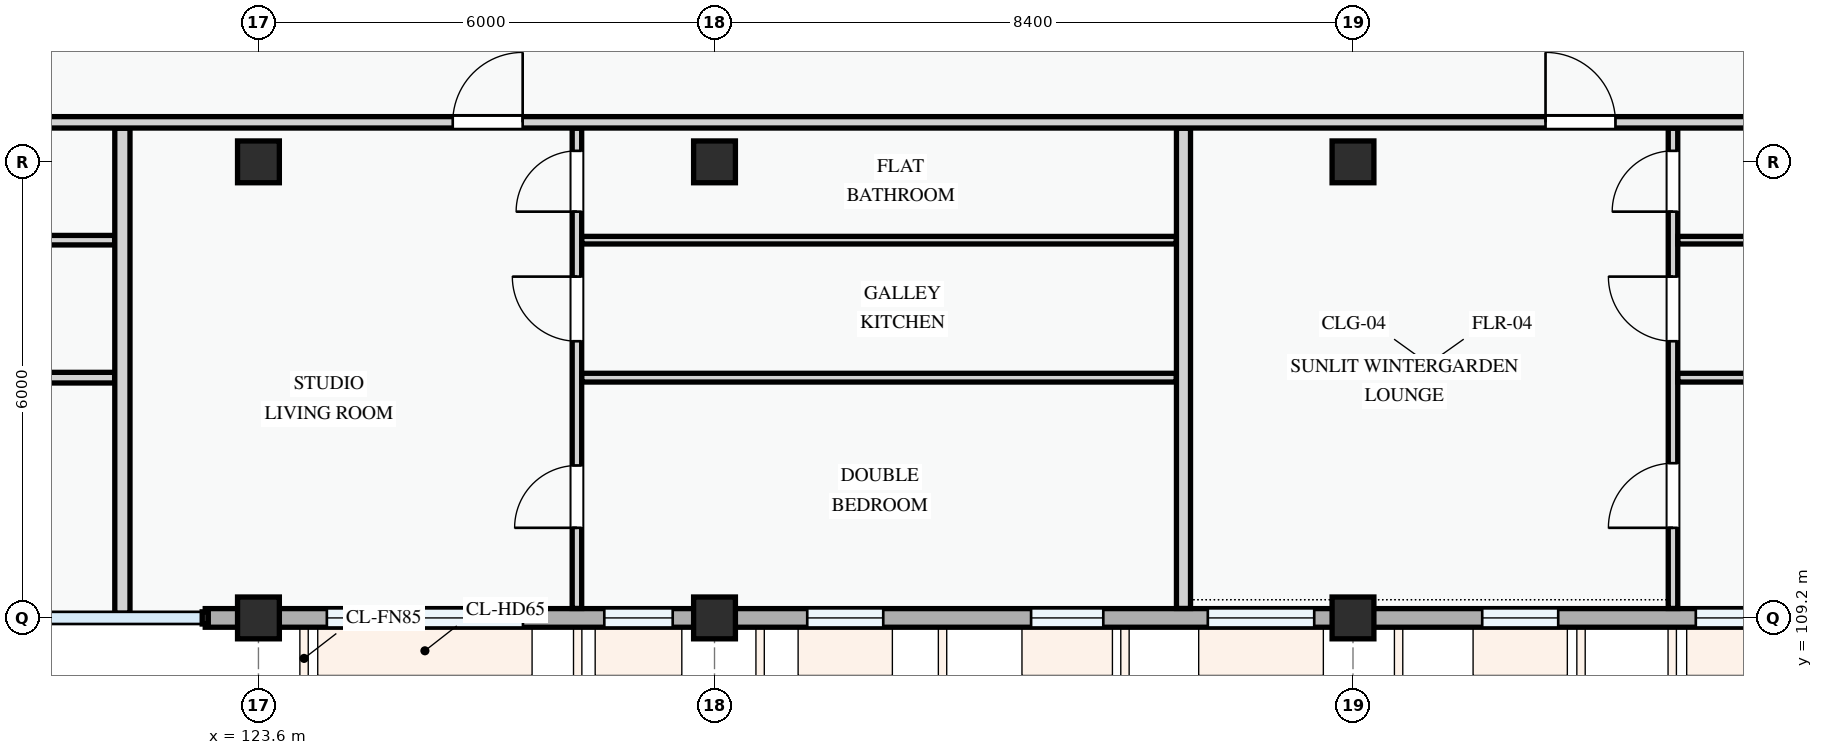
"""IFC4 building model, lengths in metres.
Left out: names, types, materials, properties, quantities, classifications, styles, units other than length and angle.
Written with IfcOpenShell. Run it as: python <this file> out.ifc"""

import sys

from ifc_helpers import new_model, si_unit, direction, frame, frame_2d, origin, origin_2d, place, context, subcontext, project, spatial, rectangle, extrude, element, fill, save


model = new_model("IFC4")
c1 = context("Model", 3, precision=1e-05, world=origin(), true_north=direction((0.0, 1.0)))
c2 = subcontext(c1, "Body", "Model", "MODEL_VIEW")
j1 = project(units=[si_unit("LENGTHUNIT", "METRE"), si_unit("PLANEANGLEUNIT", "RADIAN")], contexts=[c1])
p1 = place(None, origin())
s1 = spatial("IfcSite", under=j1, at=p1, CompositionType="ELEMENT")
p2 = place(p1, origin())
s2 = spatial("IfcBuilding", under=s1, at=p2, CompositionType="ELEMENT")
p3 = place(p2, frame((0.0, 0.0, 37.8)))
s3 = spatial("IfcBuildingStorey", under=s2, at=p3, CompositionType="ELEMENT", Elevation=37.8)
for number, where, z_axis, x_axis in (
    (1, (123.6, 109.2, 0.0), (0.0, 0.0, 1.0), (1.0, 0.0, 0.0)),
    (2, (123.6, 115.2, 0.0), (0.0, 0.0, 1.0), (1.0, 0.0, 0.0)),
    (3, (129.6, 109.2, 0.0), (0.0, 0.0, 1.0), (1.0, 0.0, 0.0)),
    (4, (129.6, 115.2, 0.0), (0.0, 0.0, 1.0), (1.0, 0.0, 0.0)),
    (5, (138.0, 109.2, 0.0), (0.0, 0.0, 1.0), (1.0, 0.0, 0.0)),
    (6, (138.0, 115.2, 0.0), (0.0, 0.0, 1.0), (1.0, 0.0, 0.0)),
):
    element("IfcColumn", number, at=place(p3, frame(where, z_axis=z_axis, x_axis=x_axis)), inside=s3, PredefinedType="COLUMN", context=c2, shape_type="SweptSolid", body=[
        extrude(rectangle(XDim=0.55, YDim=0.55, at=origin_2d()), origin(), (0.0, 0.0, 1.0), 3.3),
    ])
p4 = place(p3, frame((122.9, 109.2, 0.0), z_axis=(0.0, 0.0, 1.0), x_axis=(1.0, 0.0, 0.0)))
e7 = element("IfcWall", 7, at=p4, inside=s3, PredefinedType="STANDARD", context=c2, shape_type="SweptSolid", body=[
    extrude(rectangle(XDim=0.7, YDim=0.245, at=frame_2d((0.35, 0.0))), origin(), (0.0, 0.0, 1.0), 2.375),
])
p5 = place(p3, frame((123.6, 109.2, 0.0), z_axis=(0.0, 0.0, 1.0), x_axis=(1.0, 0.0, 0.0)))
e8 = element("IfcWall", 8, at=p5, inside=s3, PredefinedType="STANDARD", context=c2, shape_type="SweptSolid", body=[
    extrude(rectangle(XDim=6.0, YDim=0.245, at=frame_2d((3.0, 0.0))), origin(), (0.0, 0.0, 1.0), 2.525),
])
p6 = place(p5, frame((0.9, 0.0, 0.78)))
e9 = element("IfcOpeningElement", 9, at=p6, cuts=e8, PredefinedType="OPENING", context=c2, shape_type="SweptSolid", body=[
    extrude(rectangle(XDim=2.58, YDim=1.48, at=frame_2d((1.29, 0.74))), frame((0.0, 0.133, 0.0), z_axis=(0.0, -1.0, 0.0), x_axis=(1.0, 0.0, 0.0)), (0.0, 0.0, 1.0), 0.265),
])
p7 = place(p5, frame((4.55, 0.0, 0.78)))
e10 = element("IfcOpeningElement", 10, at=p7, cuts=e8, PredefinedType="OPENING", context=c2, shape_type="SweptSolid", body=[
    extrude(rectangle(XDim=0.9, YDim=1.2, at=frame_2d((0.45, 0.6))), frame((0.0, 0.133, 0.0), z_axis=(0.0, -1.0, 0.0), x_axis=(1.0, 0.0, 0.0)), (0.0, 0.0, 1.0), 0.265),
])
p8 = place(p3, frame((129.6, 109.2, 0.0), z_axis=(0.0, 0.0, 1.0), x_axis=(1.0, 0.0, 0.0)))
e11 = element("IfcWall", 11, at=p8, inside=s3, PredefinedType="STANDARD", context=c2, shape_type="SweptSolid", body=[
    extrude(rectangle(XDim=8.4, YDim=0.245, at=frame_2d((4.2, 0.0))), origin(), (0.0, 0.0, 1.0), 2.375),
])
p9 = place(p8, frame((1.22, 0.0, 0.78)))
e12 = element("IfcOpeningElement", 12, at=p9, cuts=e11, PredefinedType="OPENING", context=c2, shape_type="SweptSolid", body=[
    extrude(rectangle(XDim=1.0, YDim=1.25, at=frame_2d((0.5, 0.625))), frame((0.0, 0.133, 0.0), z_axis=(0.0, -1.0, 0.0), x_axis=(1.0, 0.0, 0.0)), (0.0, 0.0, 1.0), 0.265),
])
p10 = place(p8, frame((4.165, 0.0, 0.78)))
e13 = element("IfcOpeningElement", 13, at=p10, cuts=e11, PredefinedType="OPENING", context=c2, shape_type="SweptSolid", body=[
    extrude(rectangle(XDim=0.95, YDim=1.15, at=frame_2d((0.475, 0.575))), frame((0.0, 0.133, 0.0), z_axis=(0.0, -1.0, 0.0), x_axis=(1.0, 0.0, 0.0)), (0.0, 0.0, 1.0), 0.265),
])
p11 = place(p8, frame((6.49, 0.0, 0.78)))
e14 = element("IfcOpeningElement", 14, at=p11, cuts=e11, PredefinedType="OPENING", context=c2, shape_type="SweptSolid", body=[
    extrude(rectangle(XDim=1.4, YDim=1.45, at=frame_2d((0.7, 0.725))), frame((0.0, 0.133, 0.0), z_axis=(0.0, -1.0, 0.0), x_axis=(1.0, 0.0, 0.0)), (0.0, 0.0, 1.0), 0.265),
])
p12 = place(p3, frame((138.0, 109.2, 0.0), z_axis=(0.0, 0.0, 1.0), x_axis=(1.0, 0.0, 0.0)))
e15 = element("IfcWall", 15, at=p12, inside=s3, PredefinedType="STANDARD", context=c2, shape_type="SweptSolid", body=[
    extrude(rectangle(XDim=6.0, YDim=0.245, at=frame_2d((3.0, 0.0))), origin(), (0.0, 0.0, 1.0), 2.525),
])
p13 = place(p12, frame((1.7, 0.0, 0.78)))
e16 = element("IfcOpeningElement", 16, at=p13, cuts=e15, PredefinedType="OPENING", context=c2, shape_type="SweptSolid", body=[
    extrude(rectangle(XDim=1.0, YDim=1.25, at=frame_2d((0.5, 0.625))), frame((0.0, 0.133, 0.0), z_axis=(0.0, -1.0, 0.0), x_axis=(1.0, 0.0, 0.0)), (0.0, 0.0, 1.0), 0.265),
])
p14 = place(p12, frame((4.51, 0.0, 0.78)))
e17 = element("IfcOpeningElement", 17, at=p14, cuts=e15, PredefinedType="OPENING", context=c2, shape_type="SweptSolid", body=[
    extrude(rectangle(XDim=1.0, YDim=1.25, at=frame_2d((0.5, 0.625))), frame((0.0, 0.133, 0.0), z_axis=(0.0, -1.0, 0.0), x_axis=(1.0, 0.0, 0.0)), (0.0, 0.0, 1.0), 0.265),
])
p15 = place(p3, frame((116.987, 112.361, 0.0), z_axis=(0.0, 0.0, 1.0), x_axis=(1.0, 0.0, 0.0)))
e18 = element("IfcWall", 18, at=p15, inside=s3, PredefinedType="PARTITIONING", context=c2, shape_type="SweptSolid", body=[
    extrude(rectangle(XDim=4.721, YDim=0.14, at=frame_2d((2.36, 0.0))), origin(), (0.0, 0.0, 1.0), 3.0),
])
p16 = place(p3, frame((116.987, 114.17, 0.0), z_axis=(0.0, 0.0, 1.0), x_axis=(1.0, 0.0, 0.0)))
e19 = element("IfcWall", 19, at=p16, inside=s3, PredefinedType="PARTITIONING", context=c2, shape_type="SweptSolid", body=[
    extrude(rectangle(XDim=4.721, YDim=0.125, at=frame_2d((2.36, 0.0))), origin(), (0.0, 0.0, 1.0), 3.0),
])
p17 = place(p3, frame((127.79, 109.324, 0.0), z_axis=(0.0, 0.0, 1.0), x_axis=(0.0, 1.0, 0.0)))
e20 = element("IfcWall", 20, at=p17, inside=s3, PredefinedType="PARTITIONING", context=c2, shape_type="SweptSolid", body=[
    extrude(rectangle(XDim=6.319, YDim=0.125, at=frame_2d((3.159, 0.0))), origin(), (0.0, 0.0, 1.0), 3.0),
])
p18 = place(p17, frame((1.061, 0.0, 0.0)))
e21 = element("IfcOpeningElement", 21, at=p18, cuts=e20, PredefinedType="OPENING", context=c2, shape_type="SweptSolid", body=[
    extrude(rectangle(XDim=0.82, YDim=2.08, at=frame_2d((0.41, 1.04))), frame((0.0, 0.073, 0.0), z_axis=(0.0, -1.0, 0.0), x_axis=(1.0, 0.0, 0.0)), (0.0, 0.0, 1.0), 0.145),
])
p19 = place(p17, frame((3.516, 0.0, 0.0)))
e22 = element("IfcOpeningElement", 22, at=p19, cuts=e20, PredefinedType="OPENING", context=c2, shape_type="SweptSolid", body=[
    extrude(rectangle(XDim=0.85, YDim=2.1, at=frame_2d((0.425, 1.05))), frame((0.0, 0.073, 0.0), z_axis=(0.0, -1.0, 0.0), x_axis=(1.0, 0.0, 0.0)), (0.0, 0.0, 1.0), 0.145),
])
p20 = place(p17, frame((5.22, 0.0, 0.0)))
e23 = element("IfcOpeningElement", 23, at=p20, cuts=e20, PredefinedType="OPENING", context=c2, shape_type="SweptSolid", body=[
    extrude(rectangle(XDim=0.8, YDim=2.1, at=frame_2d((0.4, 1.05))), frame((0.0, 0.073, 0.0), z_axis=(0.0, -1.0, 0.0), x_axis=(1.0, 0.0, 0.0)), (0.0, 0.0, 1.0), 0.145),
])
p21 = place(p3, frame((127.854, 112.361, 0.0), z_axis=(0.0, 0.0, 1.0), x_axis=(1.0, 0.0, 0.0)))
e24 = element("IfcWall", 24, at=p21, inside=s3, PredefinedType="PARTITIONING", context=c2, shape_type="SweptSolid", body=[
    extrude(rectangle(XDim=7.821, YDim=0.115, at=frame_2d((3.911, 0.0))), origin(), (0.0, 0.0, 1.0), 3.0),
])
p22 = place(p3, frame((127.854, 114.17, 0.0), z_axis=(0.0, 0.0, 1.0), x_axis=(1.0, 0.0, 0.0)))
e25 = element("IfcWall", 25, at=p22, inside=s3, PredefinedType="PARTITIONING", context=c2, shape_type="SweptSolid", body=[
    extrude(rectangle(XDim=7.821, YDim=0.1, at=frame_2d((3.911, 0.0))), origin(), (0.0, 0.0, 1.0), 3.0),
])
p23 = place(p3, frame((121.81, 109.26, 0.0), z_axis=(0.0, 0.0, 1.0), x_axis=(0.0, 1.0, 0.0)))
e26 = element("IfcWall", 26, at=p23, inside=s3, PredefinedType="PARTITIONING", context=c2, shape_type="SweptSolid", body=[
    extrude(rectangle(XDim=6.383, YDim=0.2, at=frame_2d((3.191, 0.0))), origin(), (0.0, 0.0, 1.0), 3.0),
])
p24 = place(p3, frame((142.21, 109.324, 0.0), z_axis=(0.0, 0.0, 1.0), x_axis=(0.0, 1.0, 0.0)))
e27 = element("IfcWall", 27, at=p24, inside=s3, PredefinedType="PARTITIONING", context=c2, shape_type="SweptSolid", body=[
    extrude(rectangle(XDim=6.319, YDim=0.125, at=frame_2d((3.159, 0.0))), origin(), (0.0, 0.0, 1.0), 3.0),
])
p25 = place(p24, frame((1.061, 0.0, 0.0)))
e28 = element("IfcOpeningElement", 28, at=p25, cuts=e27, PredefinedType="OPENING", context=c2, shape_type="SweptSolid", body=[
    extrude(rectangle(XDim=0.85, YDim=2.1, at=frame_2d((0.425, 1.05))), frame((0.0, 0.073, 0.0), z_axis=(0.0, -1.0, 0.0), x_axis=(1.0, 0.0, 0.0)), (0.0, 0.0, 1.0), 0.145),
])
p26 = place(p24, frame((3.516, 0.0, 0.0)))
e29 = element("IfcOpeningElement", 29, at=p26, cuts=e27, PredefinedType="OPENING", context=c2, shape_type="SweptSolid", body=[
    extrude(rectangle(XDim=0.85, YDim=2.1, at=frame_2d((0.425, 1.05))), frame((0.0, 0.073, 0.0), z_axis=(0.0, -1.0, 0.0), x_axis=(1.0, 0.0, 0.0)), (0.0, 0.0, 1.0), 0.145),
])
p27 = place(p24, frame((5.22, 0.0, 0.0)))
e30 = element("IfcOpeningElement", 30, at=p27, cuts=e27, PredefinedType="OPENING", context=c2, shape_type="SweptSolid", body=[
    extrude(rectangle(XDim=0.8, YDim=2.1, at=frame_2d((0.4, 1.05))), frame((0.0, 0.073, 0.0), z_axis=(0.0, -1.0, 0.0), x_axis=(1.0, 0.0, 0.0)), (0.0, 0.0, 1.0), 0.145),
])
p28 = place(p3, frame((142.274, 112.361, 0.0), z_axis=(0.0, 0.0, 1.0), x_axis=(1.0, 0.0, 0.0)))
e31 = element("IfcWall", 31, at=p28, inside=s3, PredefinedType="PARTITIONING", context=c2, shape_type="SweptSolid", body=[
    extrude(rectangle(XDim=7.698, YDim=0.115, at=frame_2d((3.849, 0.0))), origin(), (0.0, 0.0, 1.0), 3.0),
])
p29 = place(p3, frame((142.274, 114.17, 0.0), z_axis=(0.0, 0.0, 1.0), x_axis=(1.0, 0.0, 0.0)))
e32 = element("IfcWall", 32, at=p29, inside=s3, PredefinedType="PARTITIONING", context=c2, shape_type="SweptSolid", body=[
    extrude(rectangle(XDim=7.698, YDim=0.1, at=frame_2d((3.849, 0.0))), origin(), (0.0, 0.0, 1.0), 3.0),
])
p30 = place(p3, frame((135.77, 109.324, 0.0), z_axis=(0.0, 0.0, 1.0), x_axis=(0.0, 1.0, 0.0)))
e33 = element("IfcWall", 33, at=p30, inside=s3, PredefinedType="PARTITIONING", context=c2, shape_type="SweptSolid", body=[
    extrude(rectangle(XDim=6.319, YDim=0.185, at=frame_2d((3.159, 0.0))), origin(), (0.0, 0.0, 1.0), 3.0),
])
p31 = place(p3, frame((109.324, 115.72, 0.0), z_axis=(0.0, 0.0, 1.0), x_axis=(1.0, 0.0, 0.0)))
e34 = element("IfcWall", 34, at=p31, inside=s3, PredefinedType="PARTITIONING", context=c2, shape_type="SweptSolid", body=[
    extrude(rectangle(XDim=40.726, YDim=0.15, at=frame_2d((20.363, 0.0))), origin(), (0.0, 0.0, 1.0), 3.0),
])
p32 = place(p31, frame((2.322, 0.0, 0.0)))
e35 = element("IfcOpeningElement", 35, at=p32, cuts=e34, PredefinedType="OPENING", context=c2, shape_type="SweptSolid", body=[
    extrude(rectangle(XDim=0.92, YDim=2.1, at=frame_2d((0.46, 1.05))), frame((0.0, 0.085, 0.0), z_axis=(0.0, -1.0, 0.0), x_axis=(1.0, 0.0, 0.0)), (0.0, 0.0, 1.0), 0.17),
])
p33 = place(p31, frame((16.832, 0.0, 0.0)))
e36 = element("IfcOpeningElement", 36, at=p33, cuts=e34, PredefinedType="OPENING", context=c2, shape_type="SweptSolid", body=[
    extrude(rectangle(XDim=0.92, YDim=2.1, at=frame_2d((0.46, 1.05))), frame((0.0, 0.085, 0.0), z_axis=(0.0, -1.0, 0.0), x_axis=(1.0, 0.0, 0.0)), (0.0, 0.0, 1.0), 0.17),
])
p34 = place(p31, frame((31.208, 0.0, 0.0)))
e37 = element("IfcOpeningElement", 37, at=p34, cuts=e34, PredefinedType="OPENING", context=c2, shape_type="SweptSolid", body=[
    extrude(rectangle(XDim=0.92, YDim=2.1, at=frame_2d((0.46, 1.05))), frame((0.0, 0.085, 0.0), z_axis=(0.0, -1.0, 0.0), x_axis=(1.0, 0.0, 0.0)), (0.0, 0.0, 1.0), 0.17),
])
p35 = place(p6, origin())
e38 = element("IfcWindow", 38, at=p35, inside=s3, PartitioningType="DOUBLE_PANEL_VERTICAL", PredefinedType="WINDOW", context=c2, shape_type="SweptSolid", body=[
    extrude(rectangle(XDim=2.58, YDim=1.48, at=frame_2d((1.29, 0.74))), frame((0.0, 0.03, 0.0), z_axis=(0.0, -1.0, 0.0), x_axis=(1.0, 0.0, 0.0)), (0.0, 0.0, 1.0), 0.06),
])
fill(e9, e38)
p36 = place(p7, origin())
e39 = element("IfcWindow", 39, at=p36, inside=s3, PartitioningType="SINGLE_PANEL", PredefinedType="WINDOW", context=c2, shape_type="SweptSolid", body=[
    extrude(rectangle(XDim=0.9, YDim=1.2, at=frame_2d((0.45, 0.6))), frame((0.0, 0.03, 0.0), z_axis=(0.0, -1.0, 0.0), x_axis=(1.0, 0.0, 0.0)), (0.0, 0.0, 1.0), 0.06),
])
fill(e10, e39)
p37 = place(p9, origin())
e40 = element("IfcWindow", 40, at=p37, inside=s3, PartitioningType="SINGLE_PANEL", PredefinedType="WINDOW", context=c2, shape_type="SweptSolid", body=[
    extrude(rectangle(XDim=1.0, YDim=1.25, at=frame_2d((0.5, 0.625))), frame((0.0, 0.03, 0.0), z_axis=(0.0, -1.0, 0.0), x_axis=(1.0, 0.0, 0.0)), (0.0, 0.0, 1.0), 0.06),
])
fill(e12, e40)
p38 = place(p10, origin())
e41 = element("IfcWindow", 41, at=p38, inside=s3, PartitioningType="SINGLE_PANEL", PredefinedType="WINDOW", context=c2, shape_type="SweptSolid", body=[
    extrude(rectangle(XDim=0.95, YDim=1.15, at=frame_2d((0.475, 0.575))), frame((0.0, 0.03, 0.0), z_axis=(0.0, -1.0, 0.0), x_axis=(1.0, 0.0, 0.0)), (0.0, 0.0, 1.0), 0.06),
])
fill(e13, e41)
p39 = place(p11, origin())
e42 = element("IfcWindow", 42, at=p39, inside=s3, PartitioningType="SINGLE_PANEL", PredefinedType="WINDOW", context=c2, shape_type="SweptSolid", body=[
    extrude(rectangle(XDim=1.4, YDim=1.45, at=frame_2d((0.7, 0.725))), frame((0.0, 0.03, 0.0), z_axis=(0.0, -1.0, 0.0), x_axis=(1.0, 0.0, 0.0)), (0.0, 0.0, 1.0), 0.06),
])
fill(e14, e42)
p40 = place(p13, origin())
e43 = element("IfcWindow", 43, at=p40, inside=s3, PartitioningType="SINGLE_PANEL", PredefinedType="WINDOW", context=c2, shape_type="SweptSolid", body=[
    extrude(rectangle(XDim=1.0, YDim=1.25, at=frame_2d((0.5, 0.625))), frame((0.0, 0.03, 0.0), z_axis=(0.0, -1.0, 0.0), x_axis=(1.0, 0.0, 0.0)), (0.0, 0.0, 1.0), 0.06),
])
fill(e16, e43)
p41 = place(p14, origin())
e44 = element("IfcWindow", 44, at=p41, inside=s3, PartitioningType="SINGLE_PANEL", PredefinedType="WINDOW", context=c2, shape_type="SweptSolid", body=[
    extrude(rectangle(XDim=1.0, YDim=1.25, at=frame_2d((0.5, 0.625))), frame((0.0, 0.03, 0.0), z_axis=(0.0, -1.0, 0.0), x_axis=(1.0, 0.0, 0.0)), (0.0, 0.0, 1.0), 0.06),
])
fill(e17, e44)
p42 = place(p18, origin())
e45 = element("IfcDoor", 45, at=p42, inside=s3, OperationType="SINGLE_SWING_LEFT", PredefinedType="DOOR", context=c2, shape_type="SweptSolid", body=[
    extrude(rectangle(XDim=0.82, YDim=2.08, at=frame_2d((0.41, 1.04))), frame((0.0, 0.025, 0.0), z_axis=(0.0, -1.0, 0.0), x_axis=(1.0, 0.0, 0.0)), (0.0, 0.0, 1.0), 0.05),
])
fill(e21, e45)
p43 = place(p19, origin())
e46 = element("IfcDoor", 46, at=p43, inside=s3, OperationType="SINGLE_SWING_RIGHT", PredefinedType="DOOR", context=c2, shape_type="SweptSolid", body=[
    extrude(rectangle(XDim=0.85, YDim=2.1, at=frame_2d((0.425, 1.05))), frame((0.0, 0.025, 0.0), z_axis=(0.0, -1.0, 0.0), x_axis=(1.0, 0.0, 0.0)), (0.0, 0.0, 1.0), 0.05),
])
fill(e22, e46)
p44 = place(p20, origin())
e47 = element("IfcDoor", 47, at=p44, inside=s3, OperationType="SINGLE_SWING_LEFT", PredefinedType="DOOR", context=c2, shape_type="SweptSolid", body=[
    extrude(rectangle(XDim=0.8, YDim=2.1, at=frame_2d((0.4, 1.05))), frame((0.0, 0.025, 0.0), z_axis=(0.0, -1.0, 0.0), x_axis=(1.0, 0.0, 0.0)), (0.0, 0.0, 1.0), 0.05),
])
fill(e23, e47)
p45 = place(p25, origin())
e48 = element("IfcDoor", 48, at=p45, inside=s3, OperationType="SINGLE_SWING_LEFT", PredefinedType="DOOR", context=c2, shape_type="SweptSolid", body=[
    extrude(rectangle(XDim=0.85, YDim=2.1, at=frame_2d((0.425, 1.05))), frame((0.0, 0.025, 0.0), z_axis=(0.0, -1.0, 0.0), x_axis=(1.0, 0.0, 0.0)), (0.0, 0.0, 1.0), 0.05),
])
fill(e28, e48)
p46 = place(p26, origin())
e49 = element("IfcDoor", 49, at=p46, inside=s3, OperationType="SINGLE_SWING_RIGHT", PredefinedType="DOOR", context=c2, shape_type="SweptSolid", body=[
    extrude(rectangle(XDim=0.85, YDim=2.1, at=frame_2d((0.425, 1.05))), frame((0.0, 0.025, 0.0), z_axis=(0.0, -1.0, 0.0), x_axis=(1.0, 0.0, 0.0)), (0.0, 0.0, 1.0), 0.05),
])
fill(e29, e49)
p47 = place(p27, origin())
e50 = element("IfcDoor", 50, at=p47, inside=s3, OperationType="SINGLE_SWING_LEFT", PredefinedType="DOOR", context=c2, shape_type="SweptSolid", body=[
    extrude(rectangle(XDim=0.8, YDim=2.1, at=frame_2d((0.4, 1.05))), frame((0.0, 0.025, 0.0), z_axis=(0.0, -1.0, 0.0), x_axis=(1.0, 0.0, 0.0)), (0.0, 0.0, 1.0), 0.05),
])
fill(e30, e50)
p48 = place(p33, origin())
e51 = element("IfcDoor", 51, at=p48, inside=s3, OperationType="SINGLE_SWING_RIGHT", PredefinedType="DOOR", context=c2, shape_type="SweptSolid", body=[
    extrude(rectangle(XDim=0.92, YDim=2.1, at=frame_2d((0.46, 1.05))), frame((0.0, 0.025, 0.0), z_axis=(0.0, -1.0, 0.0), x_axis=(1.0, 0.0, 0.0)), (0.0, 0.0, 1.0), 0.05),
])
fill(e36, e51)
p49 = place(p34, origin())
e52 = element("IfcDoor", 52, at=p49, inside=s3, OperationType="SINGLE_SWING_LEFT", PredefinedType="DOOR", context=c2, shape_type="SweptSolid", body=[
    extrude(rectangle(XDim=0.92, YDim=2.1, at=frame_2d((0.46, 1.05))), frame((0.0, 0.025, 0.0), z_axis=(0.0, -1.0, 0.0), x_axis=(1.0, 0.0, 0.0)), (0.0, 0.0, 1.0), 0.05),
])
fill(e37, e52)
save(model, sys.argv[1])
